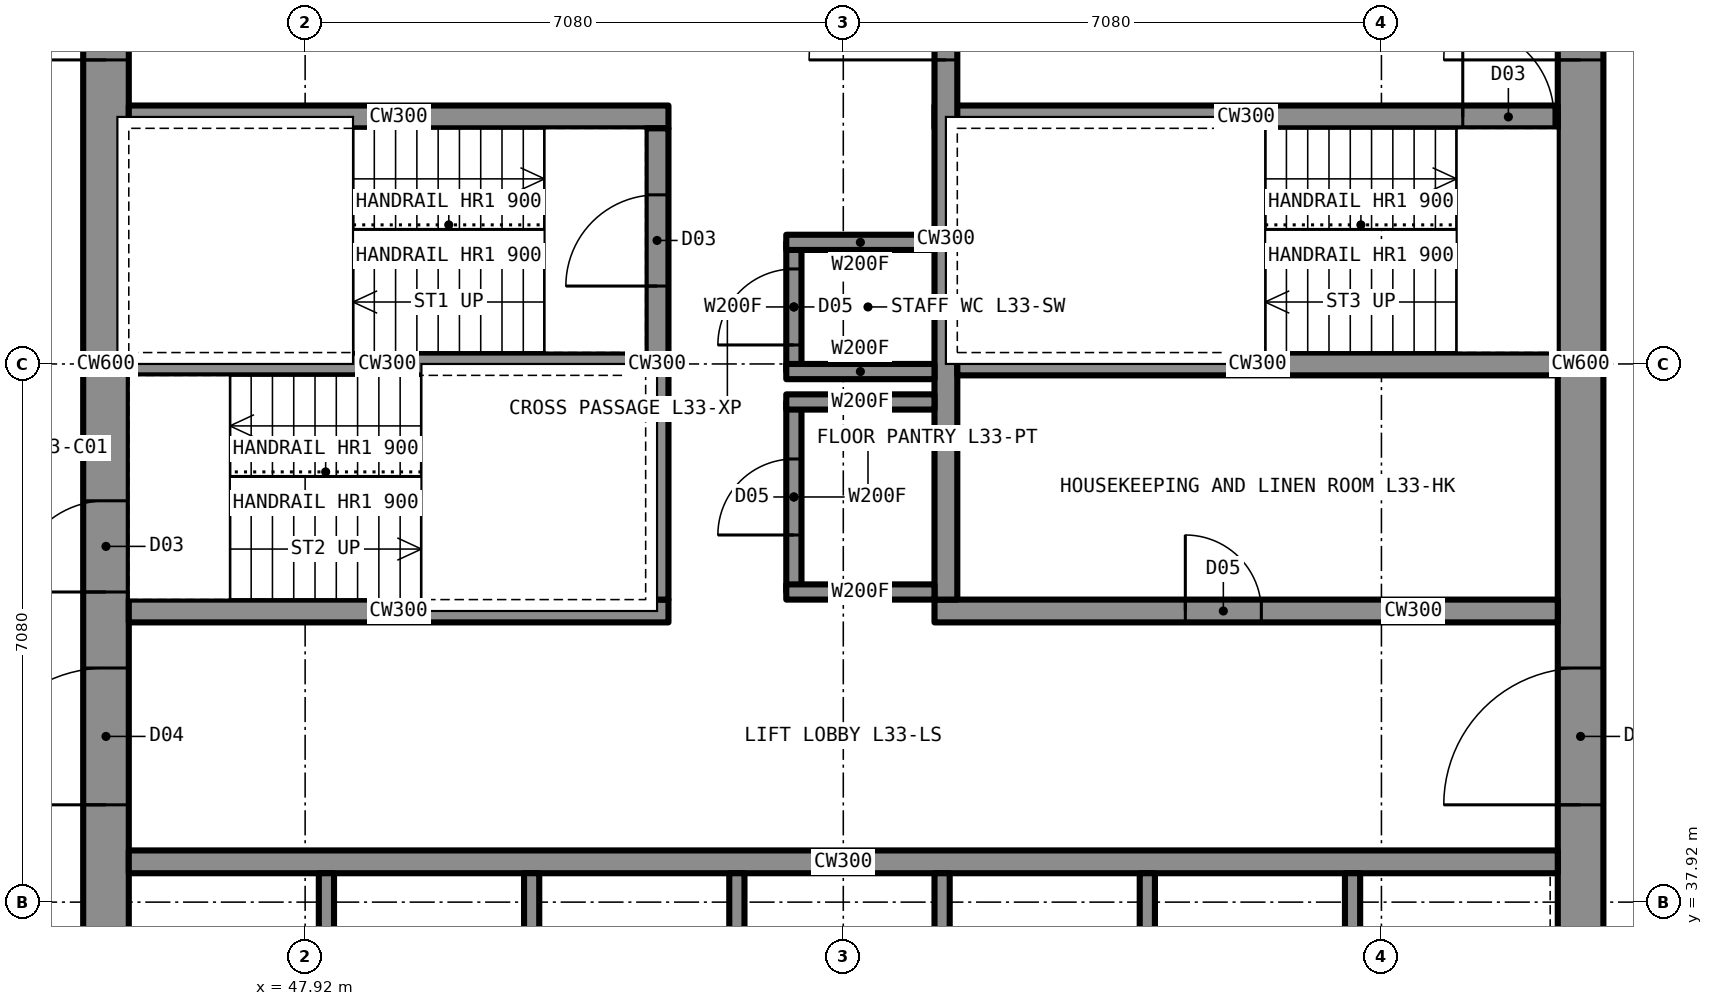
"""IFC4 building model, lengths in metres.
Left out: names, types, materials, properties, quantities, classifications, styles, units other than length and angle.
Written with IfcOpenShell. Run it as: python <this file> out.ifc"""

import sys

from ifc_helpers import new_model, si_unit, direction, frame, frame_2d, origin, place, context, subcontext, project, spatial, rectangle, extrude, element, fill, save


model = new_model("IFC4")
c1 = context("Model", 3, precision=1e-05, world=origin(), true_north=direction((0.0, 1.0)))
c2 = subcontext(c1, "Body", "Model", "MODEL_VIEW")
j1 = project(units=[si_unit("LENGTHUNIT", "METRE"), si_unit("PLANEANGLEUNIT", "RADIAN")], contexts=[c1])
p1 = place(None, origin())
s1 = spatial("IfcSite", under=j1, at=p1, CompositionType="ELEMENT")
p2 = place(p1, origin())
s2 = spatial("IfcBuilding", under=s1, at=p2, CompositionType="ELEMENT")
p3 = place(p2, frame((0.0, 0.0, 124.9)))
s3 = spatial("IfcBuildingStorey", under=s2, at=p3, CompositionType="ELEMENT", Elevation=124.9)
p4 = place(p3, frame((64.7, 35.6, 0.0), z_axis=(0.0, 0.0, 1.0), x_axis=(0.0, 1.0, 0.0)))
e1 = element("IfcWall", 1, at=p4, inside=s3, PredefinedType="SHEAR", context=c2, shape_type="SweptSolid", body=[
    extrude(rectangle(XDim=18.8, YDim=0.6, at=frame_2d((9.4, 0.0))), origin(), (0.0, 0.0, 1.0), 3.5),
])
p5 = place(p4, frame((13.4, 0.0, 0.0)))
e2 = element("IfcOpeningElement", 2, at=p5, cuts=e1, PredefinedType="OPENING", context=c2, shape_type="SweptSolid", body=[
    extrude(rectangle(XDim=1.8, YDim=2.2, at=frame_2d((0.9, 1.1))), frame((0.0, 0.31, 0.0), z_axis=(0.0, -1.0, 0.0), x_axis=(1.0, 0.0, 0.0)), (0.0, 0.0, 1.0), 0.62),
])
p6 = place(p4, frame((3.6, 0.0, 0.0)))
e3 = element("IfcOpeningElement", 3, at=p6, cuts=e1, PredefinedType="OPENING", context=c2, shape_type="SweptSolid", body=[
    extrude(rectangle(XDim=1.8, YDim=2.2, at=frame_2d((0.9, 1.1))), frame((0.0, 0.31, 0.0), z_axis=(0.0, -1.0, 0.0), x_axis=(1.0, 0.0, 0.0)), (0.0, 0.0, 1.0), 0.62),
])
p7 = place(p3, frame((45.3, 35.6, 0.0), z_axis=(0.0, 0.0, 1.0), x_axis=(0.0, 1.0, 0.0)))
e4 = element("IfcWall", 4, at=p7, inside=s3, PredefinedType="SHEAR", context=c2, shape_type="SweptSolid", body=[
    extrude(rectangle(XDim=18.8, YDim=0.6, at=frame_2d((9.4, 0.0))), origin(), (0.0, 0.0, 1.0), 3.5),
])
p8 = place(p7, frame((13.4, 0.0, 0.0)))
e5 = element("IfcOpeningElement", 5, at=p8, cuts=e4, PredefinedType="OPENING", context=c2, shape_type="SweptSolid", body=[
    extrude(rectangle(XDim=1.8, YDim=2.2, at=frame_2d((0.9, 1.1))), frame((0.0, 0.31, 0.0), z_axis=(0.0, -1.0, 0.0), x_axis=(1.0, 0.0, 0.0)), (0.0, 0.0, 1.0), 0.62),
])
p9 = place(p7, frame((3.6, 0.0, 0.0)))
e6 = element("IfcOpeningElement", 6, at=p9, cuts=e4, PredefinedType="OPENING", context=c2, shape_type="SweptSolid", body=[
    extrude(rectangle(XDim=1.8, YDim=2.2, at=frame_2d((0.9, 1.1))), frame((0.0, 0.31, 0.0), z_axis=(0.0, -1.0, 0.0), x_axis=(1.0, 0.0, 0.0)), (0.0, 0.0, 1.0), 0.62),
])
p10 = place(p7, frame((6.4, 0.0, 0.0)))
e7 = element("IfcOpeningElement", 7, at=p10, cuts=e4, PredefinedType="OPENING", context=c2, shape_type="SweptSolid", body=[
    extrude(rectangle(XDim=1.2, YDim=2.2, at=frame_2d((0.6, 1.1))), frame((0.0, 0.31, 0.0), z_axis=(0.0, -1.0, 0.0), x_axis=(1.0, 0.0, 0.0)), (0.0, 0.0, 1.0), 0.62),
])
p11 = place(p3, frame((45.6, 38.45, 0.0), z_axis=(0.0, 0.0, 1.0), x_axis=(1.0, 0.0, 0.0)))
e8 = element("IfcWall", 8, at=p11, inside=s3, PredefinedType="SHEAR", context=c2, shape_type="SweptSolid", body=[
    extrude(rectangle(XDim=18.8, YDim=0.3, at=frame_2d((9.4, 0.0))), origin(), (0.0, 0.0, 1.0), 3.5),
])
p12 = place(p3, frame((45.6, 48.25, 0.0), z_axis=(0.0, 0.0, 1.0), x_axis=(1.0, 0.0, 0.0)))
e9 = element("IfcWall", 9, at=p12, inside=s3, PredefinedType="SHEAR", context=c2, shape_type="SweptSolid", body=[
    extrude(rectangle(XDim=7.1, YDim=0.3, at=frame_2d((3.55, 0.0))), origin(), (0.0, 0.0, 1.0), 3.5),
])
p13 = place(p3, frame((56.2, 48.25, 0.0), z_axis=(0.0, 0.0, 1.0), x_axis=(1.0, 0.0, 0.0)))
e10 = element("IfcWall", 10, at=p13, inside=s3, PredefinedType="SHEAR", context=c2, shape_type="SweptSolid", body=[
    extrude(rectangle(XDim=8.2, YDim=0.3, at=frame_2d((4.1, 0.0))), origin(), (0.0, 0.0, 1.0), 3.5),
])
p14 = place(p13, frame((6.95, 0.0, 0.0)))
e11 = element("IfcOpeningElement", 11, at=p14, cuts=e10, PredefinedType="OPENING", context=c2, shape_type="SweptSolid", body=[
    extrude(rectangle(XDim=1.2, YDim=2.2, at=frame_2d((0.6, 1.1))), frame((0.0, 0.16, 0.0), z_axis=(0.0, -1.0, 0.0), x_axis=(1.0, 0.0, 0.0)), (0.0, 0.0, 1.0), 0.32),
])
p15 = place(p3, frame((45.6, 41.75, 0.0), z_axis=(0.0, 0.0, 1.0), x_axis=(1.0, 0.0, 0.0)))
e12 = element("IfcWall", 12, at=p15, inside=s3, PredefinedType="SHEAR", context=c2, shape_type="SweptSolid", body=[
    extrude(rectangle(XDim=7.1, YDim=0.3, at=frame_2d((3.55, 0.0))), origin(), (0.0, 0.0, 1.0), 3.5),
])
p16 = place(p3, frame((56.2, 41.75, 0.0), z_axis=(0.0, 0.0, 1.0), x_axis=(1.0, 0.0, 0.0)))
e13 = element("IfcWall", 13, at=p16, inside=s3, PredefinedType="SHEAR", context=c2, shape_type="SweptSolid", body=[
    extrude(rectangle(XDim=8.2, YDim=0.3, at=frame_2d((4.1, 0.0))), origin(), (0.0, 0.0, 1.0), 3.5),
])
p17 = place(p16, frame((3.3, 0.0, 0.0)))
e14 = element("IfcOpeningElement", 14, at=p17, cuts=e13, PredefinedType="OPENING", context=c2, shape_type="SweptSolid", body=[
    extrude(rectangle(XDim=1.0, YDim=2.1, at=frame_2d((0.5, 1.05))), frame((0.0, 0.16, 0.0), z_axis=(0.0, -1.0, 0.0), x_axis=(1.0, 0.0, 0.0)), (0.0, 0.0, 1.0), 0.32),
])
p18 = place(p3, frame((52.55, 41.9, 0.0), z_axis=(0.0, 0.0, 1.0), x_axis=(0.0, 1.0, 0.0)))
e15 = element("IfcWall", 15, at=p18, inside=s3, PredefinedType="SHEAR", context=c2, shape_type="SweptSolid", body=[
    extrude(rectangle(XDim=6.2, YDim=0.3, at=frame_2d((3.1, 0.0))), origin(), (0.0, 0.0, 1.0), 3.5),
])
p19 = place(p18, frame((4.125, 0.0, 0.0)))
e16 = element("IfcOpeningElement", 16, at=p19, cuts=e15, PredefinedType="OPENING", context=c2, shape_type="SweptSolid", body=[
    extrude(rectangle(XDim=1.2, YDim=2.2, at=frame_2d((0.6, 1.1))), frame((0.0, 0.16, 0.0), z_axis=(0.0, -1.0, 0.0), x_axis=(1.0, 0.0, 0.0)), (0.0, 0.0, 1.0), 0.32),
])
p20 = place(p3, frame((56.35, 41.9, 0.0), z_axis=(0.0, 0.0, 1.0), x_axis=(0.0, 1.0, 0.0)))
e17 = element("IfcWall", 17, at=p20, inside=s3, PredefinedType="SHEAR", context=c2, shape_type="SweptSolid", body=[
    extrude(rectangle(XDim=9.5, YDim=0.3, at=frame_2d((4.75, 0.0))), origin(), (0.0, 0.0, 1.0), 3.5),
])
p21 = place(p20, frame((7.1, 0.0, 0.0)))
e18 = element("IfcOpeningElement", 18, at=p21, cuts=e17, PredefinedType="OPENING", context=c2, shape_type="SweptSolid", body=[
    extrude(rectangle(XDim=1.8, YDim=2.2, at=frame_2d((0.9, 1.1))), frame((0.0, 0.16, 0.0), z_axis=(0.0, -1.0, 0.0), x_axis=(1.0, 0.0, 0.0)), (0.0, 0.0, 1.0), 0.32),
])
p22 = place(p3, frame((45.6, 45.0, 0.0), z_axis=(0.0, 0.0, 1.0), x_axis=(1.0, 0.0, 0.0)))
e19 = element("IfcWall", 19, at=p22, inside=s3, PredefinedType="SHEAR", context=c2, shape_type="SweptSolid", body=[
    extrude(rectangle(XDim=6.8, YDim=0.3, at=frame_2d((3.4, 0.0))), origin(), (0.0, 0.0, 1.0), 3.5),
])
p23 = place(p3, frame((56.5, 45.0, 0.0), z_axis=(0.0, 0.0, 1.0), x_axis=(1.0, 0.0, 0.0)))
e20 = element("IfcWall", 20, at=p23, inside=s3, PredefinedType="SHEAR", context=c2, shape_type="SweptSolid", body=[
    extrude(rectangle(XDim=7.9, YDim=0.3, at=frame_2d((3.95, 0.0))), origin(), (0.0, 0.0, 1.0), 3.5),
])
p24 = place(p3, frame((54.35, 42.0, 0.0), z_axis=(0.0, 0.0, 1.0), x_axis=(0.0, 1.0, 0.0)))
e21 = element("IfcWall", 21, at=p24, inside=s3, PredefinedType="PARTITIONING", context=c2, shape_type="SweptSolid", body=[
    extrude(rectangle(XDim=2.5, YDim=0.2, at=frame_2d((1.25, 0.0))), origin(), (0.0, 0.0, 1.0), 3.33),
])
p25 = place(p24, frame((0.75, 0.0, 0.0)))
e22 = element("IfcOpeningElement", 22, at=p25, cuts=e21, PredefinedType="OPENING", context=c2, shape_type="SweptSolid", body=[
    extrude(rectangle(XDim=1.0, YDim=2.1, at=frame_2d((0.5, 1.05))), frame((0.0, 0.11, 0.0), z_axis=(0.0, -1.0, 0.0), x_axis=(1.0, 0.0, 0.0)), (0.0, 0.0, 1.0), 0.22),
])
for number, where, z_axis, x_axis in (
    (23, (54.25, 42.0, 0.0), (0.0, 0.0, 1.0), (1.0, 0.0, 0.0)),
    (24, (54.25, 44.5, 0.0), (0.0, 0.0, 1.0), (1.0, 0.0, 0.0)),
):
    element("IfcWall", number, at=place(p3, frame(where, z_axis=z_axis, x_axis=x_axis)), inside=s3, PredefinedType="PARTITIONING", context=c2, shape_type="SweptSolid", body=[
        extrude(rectangle(XDim=1.95, YDim=0.2, at=frame_2d((0.975, 0.0))), origin(), (0.0, 0.0, 1.0), 3.33),
    ])
p26 = place(p3, frame((54.35, 44.9, 0.0), z_axis=(0.0, 0.0, 1.0), x_axis=(0.0, 1.0, 0.0)))
e25 = element("IfcWall", 25, at=p26, inside=s3, PredefinedType="PARTITIONING", context=c2, shape_type="SweptSolid", body=[
    extrude(rectangle(XDim=1.7, YDim=0.2, at=frame_2d((0.85, 0.0))), origin(), (0.0, 0.0, 1.0), 3.33),
])
p27 = place(p26, frame((0.35, 0.0, 0.0)))
e26 = element("IfcOpeningElement", 26, at=p27, cuts=e25, PredefinedType="OPENING", context=c2, shape_type="SweptSolid", body=[
    extrude(rectangle(XDim=1.0, YDim=2.1, at=frame_2d((0.5, 1.05))), frame((0.0, 0.11, 0.0), z_axis=(0.0, -1.0, 0.0), x_axis=(1.0, 0.0, 0.0)), (0.0, 0.0, 1.0), 0.22),
])
for number, where, z_axis, x_axis in (
    (27, (54.25, 44.9, 0.0), (0.0, 0.0, 1.0), (1.0, 0.0, 0.0)),
    (28, (54.25, 46.6, 0.0), (0.0, 0.0, 1.0), (1.0, 0.0, 0.0)),
):
    element("IfcWall", number, at=place(p3, frame(where, z_axis=z_axis, x_axis=x_axis)), inside=s3, PredefinedType="PARTITIONING", context=c2, shape_type="SweptSolid", body=[
        extrude(rectangle(XDim=1.95, YDim=0.2, at=frame_2d((0.975, 0.0))), origin(), (0.0, 0.0, 1.0), 3.33),
    ])
for number, where, z_axis, x_axis in (
    (29, (48.2, 35.6, 0.0), (0.0, 0.0, 1.0), (0.0, 1.0, 0.0)),
    (30, (50.9, 35.6, 0.0), (0.0, 0.0, 1.0), (0.0, 1.0, 0.0)),
    (31, (53.6, 35.6, 0.0), (0.0, 0.0, 1.0), (0.0, 1.0, 0.0)),
    (32, (56.3, 35.6, 0.0), (0.0, 0.0, 1.0), (0.0, 1.0, 0.0)),
    (33, (59.0, 35.6, 0.0), (0.0, 0.0, 1.0), (0.0, 1.0, 0.0)),
    (34, (61.7, 35.6, 0.0), (0.0, 0.0, 1.0), (0.0, 1.0, 0.0)),
):
    element("IfcWall", number, at=place(p3, frame(where, z_axis=z_axis, x_axis=x_axis)), inside=s3, PredefinedType="PARTITIONING", context=c2, shape_type="SweptSolid", body=[
        extrude(rectangle(XDim=2.7, YDim=0.2, at=frame_2d((1.35, 0.0))), origin(), (0.0, 0.0, 1.0), 3.33),
    ])
p28 = place(p25, origin())
e35 = element("IfcDoor", 35, at=p28, inside=s3, OperationType="SINGLE_SWING_LEFT", PredefinedType="DOOR", context=c2, shape_type="SweptSolid", body=[
    extrude(rectangle(XDim=1.0, YDim=2.1, at=frame_2d((0.5, 1.05))), frame((0.0, 0.025, 0.0), z_axis=(0.0, -1.0, 0.0), x_axis=(1.0, 0.0, 0.0)), (0.0, 0.0, 1.0), 0.05),
])
fill(e22, e35)
p29 = place(p27, origin())
e36 = element("IfcDoor", 36, at=p29, inside=s3, OperationType="SINGLE_SWING_LEFT", PredefinedType="DOOR", context=c2, shape_type="SweptSolid", body=[
    extrude(rectangle(XDim=1.0, YDim=2.1, at=frame_2d((0.5, 1.05))), frame((0.0, 0.025, 0.0), z_axis=(0.0, -1.0, 0.0), x_axis=(1.0, 0.0, 0.0)), (0.0, 0.0, 1.0), 0.05),
])
fill(e26, e36)
p30 = place(p8, origin())
e37 = element("IfcDoor", 37, at=p30, inside=s3, OperationType="DOUBLE_DOOR_SINGLE_SWING", PredefinedType="DOOR", context=c2, shape_type="SweptSolid", body=[
    extrude(rectangle(XDim=1.8, YDim=2.2, at=frame_2d((0.9, 1.1))), frame((0.0, 0.025, 0.0), z_axis=(0.0, -1.0, 0.0), x_axis=(1.0, 0.0, 0.0)), (0.0, 0.0, 1.0), 0.05),
])
fill(e5, e37)
p31 = place(p9, origin())
e38 = element("IfcDoor", 38, at=p31, inside=s3, OperationType="DOUBLE_DOOR_SINGLE_SWING", PredefinedType="DOOR", context=c2, shape_type="SweptSolid", body=[
    extrude(rectangle(XDim=1.8, YDim=2.2, at=frame_2d((0.9, 1.1))), frame((0.0, 0.025, 0.0), z_axis=(0.0, -1.0, 0.0), x_axis=(1.0, 0.0, 0.0)), (0.0, 0.0, 1.0), 0.05),
])
fill(e6, e38)
p32 = place(p5, origin())
e39 = element("IfcDoor", 39, at=p32, inside=s3, OperationType="DOUBLE_DOOR_SINGLE_SWING", PredefinedType="DOOR", context=c2, shape_type="SweptSolid", body=[
    extrude(rectangle(XDim=1.8, YDim=2.2, at=frame_2d((0.9, 1.1))), frame((0.0, 0.025, 0.0), z_axis=(0.0, -1.0, 0.0), x_axis=(1.0, 0.0, 0.0)), (0.0, 0.0, 1.0), 0.05),
])
fill(e2, e39)
p33 = place(p6, origin())
e40 = element("IfcDoor", 40, at=p33, inside=s3, OperationType="DOUBLE_DOOR_SINGLE_SWING", PredefinedType="DOOR", context=c2, shape_type="SweptSolid", body=[
    extrude(rectangle(XDim=1.8, YDim=2.2, at=frame_2d((0.9, 1.1))), frame((0.0, 0.025, 0.0), z_axis=(0.0, -1.0, 0.0), x_axis=(1.0, 0.0, 0.0)), (0.0, 0.0, 1.0), 0.05),
])
fill(e3, e40)
p34 = place(p21, origin())
e41 = element("IfcDoor", 41, at=p34, inside=s3, OperationType="DOUBLE_DOOR_SINGLE_SWING", PredefinedType="DOOR", context=c2, shape_type="SweptSolid", body=[
    extrude(rectangle(XDim=1.8, YDim=2.2, at=frame_2d((0.9, 1.1))), frame((0.0, 0.025, 0.0), z_axis=(0.0, -1.0, 0.0), x_axis=(1.0, 0.0, 0.0)), (0.0, 0.0, 1.0), 0.05),
])
fill(e18, e41)
p35 = place(p19, origin())
e42 = element("IfcDoor", 42, at=p35, inside=s3, OperationType="SINGLE_SWING_LEFT", PredefinedType="DOOR", context=c2, shape_type="SweptSolid", body=[
    extrude(rectangle(XDim=1.2, YDim=2.2, at=frame_2d((0.6, 1.1))), frame((0.0, 0.025, 0.0), z_axis=(0.0, -1.0, 0.0), x_axis=(1.0, 0.0, 0.0)), (0.0, 0.0, 1.0), 0.05),
])
fill(e16, e42)
p36 = place(p10, origin())
e43 = element("IfcDoor", 43, at=p36, inside=s3, OperationType="SINGLE_SWING_LEFT", PredefinedType="DOOR", context=c2, shape_type="SweptSolid", body=[
    extrude(rectangle(XDim=1.2, YDim=2.2, at=frame_2d((0.6, 1.1))), frame((0.0, 0.025, 0.0), z_axis=(0.0, -1.0, 0.0), x_axis=(1.0, 0.0, 0.0)), (0.0, 0.0, 1.0), 0.05),
])
fill(e7, e43)
p37 = place(p14, origin())
e44 = element("IfcDoor", 44, at=p37, inside=s3, OperationType="SINGLE_SWING_LEFT", PredefinedType="DOOR", context=c2, shape_type="SweptSolid", body=[
    extrude(rectangle(XDim=1.2, YDim=2.2, at=frame_2d((0.6, 1.1))), frame((0.0, 0.025, 0.0), z_axis=(0.0, -1.0, 0.0), x_axis=(1.0, 0.0, 0.0)), (0.0, 0.0, 1.0), 0.05),
])
fill(e11, e44)
p38 = place(p17, origin())
e45 = element("IfcDoor", 45, at=p38, inside=s3, OperationType="SINGLE_SWING_LEFT", PredefinedType="DOOR", context=c2, shape_type="SweptSolid", body=[
    extrude(rectangle(XDim=1.0, YDim=2.1, at=frame_2d((0.5, 1.05))), frame((0.0, 0.025, 0.0), z_axis=(0.0, -1.0, 0.0), x_axis=(1.0, 0.0, 0.0)), (0.0, 0.0, 1.0), 0.05),
])
fill(e14, e45)
save(model, sys.argv[1])
